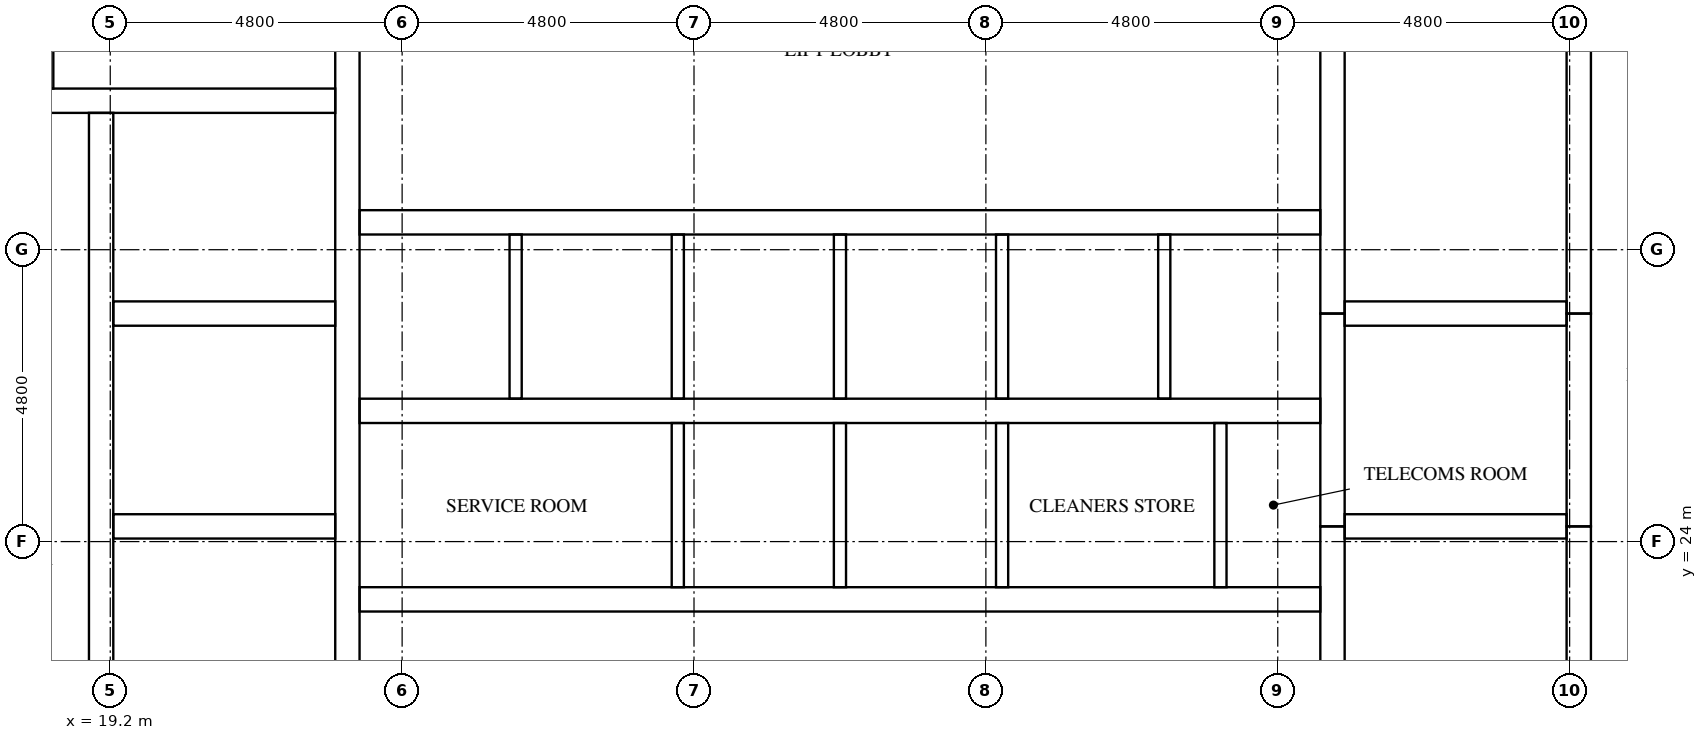
"""IFC4 building model, lengths in metres.
Left out: names, types, materials, properties, quantities, classifications, styles, units other than length and angle.
Written with IfcOpenShell. Run it as: python <this file> out.ifc"""

import sys

from ifc_helpers import new_model, si_unit, direction, frame, frame_2d, origin, place, context, subcontext, project, spatial, rectangle, extrude, element, fill, save


model = new_model("IFC4")
c1 = context("Model", 3, precision=1e-05, world=origin(), true_north=direction((0.0, 1.0)))
c2 = subcontext(c1, "Body", "Model", "MODEL_VIEW")
j1 = project(units=[si_unit("LENGTHUNIT", "METRE"), si_unit("PLANEANGLEUNIT", "RADIAN")], contexts=[c1])
p1 = place(None, origin())
s1 = spatial("IfcSite", under=j1, at=p1, CompositionType="ELEMENT")
p2 = place(p1, origin())
s2 = spatial("IfcBuilding", under=s1, at=p2, CompositionType="ELEMENT")
p3 = place(p2, frame((0.0, 0.0, 282.6)))
s3 = spatial("IfcBuildingStorey", under=s2, at=p3, CompositionType="ELEMENT", Elevation=282.6)
p4 = place(p3, frame((19.05, 15.5, 0.0), z_axis=(0.0, 0.0, 1.0), x_axis=(0.0, 1.0, 0.0)))
e1 = element("IfcWall", 1, at=p4, inside=s3, PredefinedType="SHEAR", context=c2, shape_type="SweptSolid", body=[
    extrude(rectangle(XDim=15.55, YDim=0.4, at=frame_2d((7.775, 0.0))), origin(), (0.0, 0.0, 1.0), 3.2),
])
p5 = place(p4, frame((9.95, 0.0, 0.0)))
e2 = element("IfcOpeningElement", 2, at=p5, cuts=e1, PredefinedType="OPENING", context=c2, shape_type="SweptSolid", body=[
    extrude(rectangle(XDim=1.1, YDim=2.1, at=frame_2d((0.55, 1.05))), frame((0.0, 0.21, 0.0), z_axis=(0.0, -1.0, 0.0), x_axis=(1.0, 0.0, 0.0)), (0.0, 0.0, 1.0), 0.42),
])
p6 = place(p4, frame((13.45, 0.0, 0.0)))
e3 = element("IfcOpeningElement", 3, at=p6, cuts=e1, PredefinedType="OPENING", context=c2, shape_type="SweptSolid", body=[
    extrude(rectangle(XDim=1.1, YDim=2.1, at=frame_2d((0.55, 1.05))), frame((0.0, 0.21, 0.0), z_axis=(0.0, -1.0, 0.0), x_axis=(1.0, 0.0, 0.0)), (0.0, 0.0, 1.0), 0.42),
])
p7 = place(p4, frame((0.7, 0.0, 0.0)))
e4 = element("IfcOpeningElement", 4, at=p7, cuts=e1, PredefinedType="OPENING", context=c2, shape_type="SweptSolid", body=[
    extrude(rectangle(XDim=1.2, YDim=2.1, at=frame_2d((0.6, 1.05))), frame((0.0, 0.21, 0.0), z_axis=(0.0, -1.0, 0.0), x_axis=(1.0, 0.0, 0.0)), (0.0, 0.0, 1.0), 0.42),
])
p8 = place(p3, frame((23.1, 15.5, 0.0), z_axis=(0.0, 0.0, 1.0), x_axis=(0.0, 1.0, 0.0)))
e5 = element("IfcWall", 5, at=p8, inside=s3, PredefinedType="SHEAR", context=c2, shape_type="SweptSolid", body=[
    extrude(rectangle(XDim=21.8, YDim=0.4, at=frame_2d((10.9, 0.0))), origin(), (0.0, 0.0, 1.0), 3.2),
])
p9 = place(p3, frame((39.3, 15.5, 0.0), z_axis=(0.0, 0.0, 1.0), x_axis=(0.0, 1.0, 0.0)))
e6 = element("IfcWall", 6, at=p9, inside=s3, PredefinedType="SHEAR", context=c2, shape_type="SweptSolid", body=[
    extrude(rectangle(XDim=8.75, YDim=0.4, at=frame_2d((4.375, 0.0))), origin(), (0.0, 0.0, 1.0), 3.2),
])
p10 = place(p3, frame((39.3, 24.25, 0.0), z_axis=(0.0, 0.0, 1.0), x_axis=(0.0, 1.0, 0.0)))
e7 = element("IfcWall", 7, at=p10, inside=s3, PredefinedType="SHEAR", context=c2, shape_type="SweptSolid", body=[
    extrude(rectangle(XDim=3.5, YDim=0.4, at=frame_2d((1.75, 0.0))), origin(), (0.0, 0.0, 1.0), 3.2),
])
p11 = place(p3, frame((39.3, 27.75, 0.0), z_axis=(0.0, 0.0, 1.0), x_axis=(0.0, 1.0, 0.0)))
e8 = element("IfcWall", 8, at=p11, inside=s3, PredefinedType="SHEAR", context=c2, shape_type="SweptSolid", body=[
    extrude(rectangle(XDim=9.55, YDim=0.4, at=frame_2d((4.775, 0.0))), origin(), (0.0, 0.0, 1.0), 3.2),
])
p12 = place(p3, frame((43.35, 15.5, 0.0), z_axis=(0.0, 0.0, 1.0), x_axis=(0.0, 1.0, 0.0)))
e9 = element("IfcWall", 9, at=p12, inside=s3, PredefinedType="SHEAR", context=c2, shape_type="SweptSolid", body=[
    extrude(rectangle(XDim=8.75, YDim=0.4, at=frame_2d((4.375, 0.0))), origin(), (0.0, 0.0, 1.0), 3.2),
])
p13 = place(p12, frame((0.7, 0.0, 0.0)))
e10 = element("IfcOpeningElement", 10, at=p13, cuts=e9, PredefinedType="OPENING", context=c2, shape_type="SweptSolid", body=[
    extrude(rectangle(XDim=1.2, YDim=2.1, at=frame_2d((0.6, 1.05))), frame((0.0, 0.21, 0.0), z_axis=(0.0, -1.0, 0.0), x_axis=(1.0, 0.0, 0.0)), (0.0, 0.0, 1.0), 0.42),
])
p14 = place(p3, frame((43.35, 24.25, 0.0), z_axis=(0.0, 0.0, 1.0), x_axis=(0.0, 1.0, 0.0)))
e11 = element("IfcWall", 11, at=p14, inside=s3, PredefinedType="SHEAR", context=c2, shape_type="SweptSolid", body=[
    extrude(rectangle(XDim=3.5, YDim=0.4, at=frame_2d((1.75, 0.0))), origin(), (0.0, 0.0, 1.0), 3.2),
])
p15 = place(p14, frame((1.2, 0.0, 0.0)))
e12 = element("IfcOpeningElement", 12, at=p15, cuts=e11, PredefinedType="OPENING", context=c2, shape_type="SweptSolid", body=[
    extrude(rectangle(XDim=1.1, YDim=2.1, at=frame_2d((0.55, 1.05))), frame((0.0, 0.21, 0.0), z_axis=(0.0, -1.0, 0.0), x_axis=(1.0, 0.0, 0.0)), (0.0, 0.0, 1.0), 0.42),
])
p16 = place(p3, frame((43.35, 27.75, 0.0), z_axis=(0.0, 0.0, 1.0), x_axis=(0.0, 1.0, 0.0)))
e13 = element("IfcWall", 13, at=p16, inside=s3, PredefinedType="SHEAR", context=c2, shape_type="SweptSolid", body=[
    extrude(rectangle(XDim=9.55, YDim=0.4, at=frame_2d((4.775, 0.0))), origin(), (0.0, 0.0, 1.0), 3.2),
])
p17 = place(p16, frame((7.65, 0.0, 0.0)))
e14 = element("IfcOpeningElement", 14, at=p17, cuts=e13, PredefinedType="OPENING", context=c2, shape_type="SweptSolid", body=[
    extrude(rectangle(XDim=1.2, YDim=2.1, at=frame_2d((0.6, 1.05))), frame((0.0, 0.21, 0.0), z_axis=(0.0, -1.0, 0.0), x_axis=(1.0, 0.0, 0.0)), (0.0, 0.0, 1.0), 0.42),
])
for number, where, z_axis, x_axis in (
    (15, (19.25, 24.25, 0.0), (0.0, 0.0, 1.0), (1.0, 0.0, 0.0)),
    (16, (19.25, 27.75, 0.0), (0.0, 0.0, 1.0), (1.0, 0.0, 0.0)),
):
    element("IfcWall", number, at=place(p3, frame(where, z_axis=z_axis, x_axis=x_axis)), inside=s3, PredefinedType="SHEAR", context=c2, shape_type="SweptSolid", body=[
        extrude(rectangle(XDim=3.65, YDim=0.4, at=frame_2d((1.825, 0.0))), origin(), (0.0, 0.0, 1.0), 3.2),
    ])
p18 = place(p3, frame((15.5, 31.25, 0.0), z_axis=(0.0, 0.0, 1.0), x_axis=(1.0, 0.0, 0.0)))
e17 = element("IfcWall", 17, at=p18, inside=s3, PredefinedType="SHEAR", context=c2, shape_type="SweptSolid", body=[
    extrude(rectangle(XDim=7.4, YDim=0.4, at=frame_2d((3.7, 0.0))), origin(), (0.0, 0.0, 1.0), 3.2),
])
for number, where, z_axis, x_axis in (
    (18, (39.5, 24.25, 0.0), (0.0, 0.0, 1.0), (1.0, 0.0, 0.0)),
    (19, (39.5, 27.75, 0.0), (0.0, 0.0, 1.0), (1.0, 0.0, 0.0)),
):
    element("IfcWall", number, at=place(p3, frame(where, z_axis=z_axis, x_axis=x_axis)), inside=s3, PredefinedType="SHEAR", context=c2, shape_type="SweptSolid", body=[
        extrude(rectangle(XDim=3.65, YDim=0.4, at=frame_2d((1.825, 0.0))), origin(), (0.0, 0.0, 1.0), 3.2),
    ])
p19 = place(p3, frame((23.3, 23.05, 0.0), z_axis=(0.0, 0.0, 1.0), x_axis=(1.0, 0.0, 0.0)))
e20 = element("IfcWall", 20, at=p19, inside=s3, PredefinedType="SHEAR", context=c2, shape_type="SweptSolid", body=[
    extrude(rectangle(XDim=15.8, YDim=0.4, at=frame_2d((7.9, 0.0))), origin(), (0.0, 0.0, 1.0), 3.2),
])
p20 = place(p19, frame((2.067, 0.0, 0.0)))
e21 = element("IfcOpeningElement", 21, at=p20, cuts=e20, PredefinedType="OPENING", context=c2, shape_type="SweptSolid", body=[
    extrude(rectangle(XDim=1.0, YDim=2.1, at=frame_2d((0.5, 1.05))), frame((0.0, 0.21, 0.0), z_axis=(0.0, -1.0, 0.0), x_axis=(1.0, 0.0, 0.0)), (0.0, 0.0, 1.0), 0.42),
])
p21 = place(p19, frame((11.862, 0.0, 0.0)))
e22 = element("IfcOpeningElement", 22, at=p21, cuts=e20, PredefinedType="OPENING", context=c2, shape_type="SweptSolid", body=[
    extrude(rectangle(XDim=1.0, YDim=2.1, at=frame_2d((0.5, 1.05))), frame((0.0, 0.21, 0.0), z_axis=(0.0, -1.0, 0.0), x_axis=(1.0, 0.0, 0.0)), (0.0, 0.0, 1.0), 0.42),
])
p22 = place(p19, frame((14.529, 0.0, 0.0)))
e23 = element("IfcOpeningElement", 23, at=p22, cuts=e20, PredefinedType="OPENING", context=c2, shape_type="SweptSolid", body=[
    extrude(rectangle(XDim=1.0, YDim=2.1, at=frame_2d((0.5, 1.05))), frame((0.0, 0.21, 0.0), z_axis=(0.0, -1.0, 0.0), x_axis=(1.0, 0.0, 0.0)), (0.0, 0.0, 1.0), 0.42),
])
p23 = place(p3, frame((23.3, 26.15, 0.0), z_axis=(0.0, 0.0, 1.0), x_axis=(1.0, 0.0, 0.0)))
e24 = element("IfcWall", 24, at=p23, inside=s3, PredefinedType="SHEAR", context=c2, shape_type="SweptSolid", body=[
    extrude(rectangle(XDim=15.8, YDim=0.4, at=frame_2d((7.9, 0.0))), origin(), (0.0, 0.0, 1.0), 3.2),
])
p24 = place(p3, frame((23.3, 29.25, 0.0), z_axis=(0.0, 0.0, 1.0), x_axis=(1.0, 0.0, 0.0)))
e25 = element("IfcWall", 25, at=p24, inside=s3, PredefinedType="SHEAR", context=c2, shape_type="SweptSolid", body=[
    extrude(rectangle(XDim=15.8, YDim=0.4, at=frame_2d((7.9, 0.0))), origin(), (0.0, 0.0, 1.0), 3.2),
])
p25 = place(p24, frame((0.683, 0.0, 0.0)))
e26 = element("IfcOpeningElement", 26, at=p25, cuts=e25, PredefinedType="OPENING", context=c2, shape_type="SweptSolid", body=[
    extrude(rectangle(XDim=1.1, YDim=2.1, at=frame_2d((0.55, 1.05))), frame((0.0, 0.21, 0.0), z_axis=(0.0, -1.0, 0.0), x_axis=(1.0, 0.0, 0.0)), (0.0, 0.0, 1.0), 0.42),
])
p26 = place(p24, frame((3.35, 0.0, 0.0)))
e27 = element("IfcOpeningElement", 27, at=p26, cuts=e25, PredefinedType="OPENING", context=c2, shape_type="SweptSolid", body=[
    extrude(rectangle(XDim=1.1, YDim=2.1, at=frame_2d((0.55, 1.05))), frame((0.0, 0.21, 0.0), z_axis=(0.0, -1.0, 0.0), x_axis=(1.0, 0.0, 0.0)), (0.0, 0.0, 1.0), 0.42),
])
p27 = place(p24, frame((6.017, 0.0, 0.0)))
e28 = element("IfcOpeningElement", 28, at=p27, cuts=e25, PredefinedType="OPENING", context=c2, shape_type="SweptSolid", body=[
    extrude(rectangle(XDim=1.1, YDim=2.1, at=frame_2d((0.55, 1.05))), frame((0.0, 0.21, 0.0), z_axis=(0.0, -1.0, 0.0), x_axis=(1.0, 0.0, 0.0)), (0.0, 0.0, 1.0), 0.42),
])
p28 = place(p24, frame((8.683, 0.0, 0.0)))
e29 = element("IfcOpeningElement", 29, at=p28, cuts=e25, PredefinedType="OPENING", context=c2, shape_type="SweptSolid", body=[
    extrude(rectangle(XDim=1.1, YDim=2.1, at=frame_2d((0.55, 1.05))), frame((0.0, 0.21, 0.0), z_axis=(0.0, -1.0, 0.0), x_axis=(1.0, 0.0, 0.0)), (0.0, 0.0, 1.0), 0.42),
])
p29 = place(p24, frame((11.35, 0.0, 0.0)))
e30 = element("IfcOpeningElement", 30, at=p29, cuts=e25, PredefinedType="OPENING", context=c2, shape_type="SweptSolid", body=[
    extrude(rectangle(XDim=1.1, YDim=2.1, at=frame_2d((0.55, 1.05))), frame((0.0, 0.21, 0.0), z_axis=(0.0, -1.0, 0.0), x_axis=(1.0, 0.0, 0.0)), (0.0, 0.0, 1.0), 0.42),
])
p30 = place(p24, frame((14.017, 0.0, 0.0)))
e31 = element("IfcOpeningElement", 31, at=p30, cuts=e25, PredefinedType="OPENING", context=c2, shape_type="SweptSolid", body=[
    extrude(rectangle(XDim=1.1, YDim=2.1, at=frame_2d((0.55, 1.05))), frame((0.0, 0.21, 0.0), z_axis=(0.0, -1.0, 0.0), x_axis=(1.0, 0.0, 0.0)), (0.0, 0.0, 1.0), 0.42),
])
for number, where, z_axis, x_axis in (
    (32, (25.867, 26.35, 0.0), (0.0, 0.0, 1.0), (0.0, 1.0, 0.0)),
    (33, (28.533, 23.25, 0.0), (0.0, 0.0, 1.0), (0.0, 1.0, 0.0)),
    (34, (28.533, 26.35, 0.0), (0.0, 0.0, 1.0), (0.0, 1.0, 0.0)),
    (35, (31.2, 23.25, 0.0), (0.0, 0.0, 1.0), (0.0, 1.0, 0.0)),
    (36, (31.2, 26.35, 0.0), (0.0, 0.0, 1.0), (0.0, 1.0, 0.0)),
    (37, (33.867, 23.25, 0.0), (0.0, 0.0, 1.0), (0.0, 1.0, 0.0)),
    (38, (33.867, 26.35, 0.0), (0.0, 0.0, 1.0), (0.0, 1.0, 0.0)),
    (39, (36.533, 26.35, 0.0), (0.0, 0.0, 1.0), (0.0, 1.0, 0.0)),
):
    element("IfcWall", number, at=place(p3, frame(where, z_axis=z_axis, x_axis=x_axis)), inside=s3, PredefinedType="SOLIDWALL", context=c2, shape_type="SweptSolid", body=[
        extrude(rectangle(XDim=2.7, YDim=0.2, at=frame_2d((1.35, 0.0))), origin(), (0.0, 0.0, 1.0), 3.2),
    ])
p31 = place(p3, frame((18.164, 31.45, 0.0), z_axis=(0.0, 0.0, 1.0), x_axis=(0.0, 1.0, 0.0)))
e40 = element("IfcWall", 40, at=p31, inside=s3, PredefinedType="PARTITIONING", context=c2, shape_type="SweptSolid", body=[
    extrude(rectangle(XDim=5.85, YDim=0.2, at=frame_2d((2.925, 0.0))), origin(), (0.0, 0.0, 1.0), 3.2),
])
p32 = place(p3, frame((37.457, 23.25, 0.0), z_axis=(0.0, 0.0, 1.0), x_axis=(0.0, 1.0, 0.0)))
e41 = element("IfcWall", 41, at=p32, inside=s3, PredefinedType="PARTITIONING", context=c2, shape_type="SweptSolid", body=[
    extrude(rectangle(XDim=2.7, YDim=0.2, at=frame_2d((1.35, 0.0))), origin(), (0.0, 0.0, 1.0), 3.2),
])
p33 = place(p25, origin())
e42 = element("IfcDoor", 42, at=p33, inside=s3, OperationType="DOUBLE_DOOR_SLIDING", PredefinedType="DOOR", context=c2, shape_type="SweptSolid", body=[
    extrude(rectangle(XDim=1.1, YDim=2.1, at=frame_2d((0.55, 1.05))), frame((0.0, 0.025, 0.0), z_axis=(0.0, -1.0, 0.0), x_axis=(1.0, 0.0, 0.0)), (0.0, 0.0, 1.0), 0.05),
])
fill(e26, e42)
p34 = place(p26, origin())
e43 = element("IfcDoor", 43, at=p34, inside=s3, OperationType="DOUBLE_DOOR_SLIDING", PredefinedType="DOOR", context=c2, shape_type="SweptSolid", body=[
    extrude(rectangle(XDim=1.1, YDim=2.1, at=frame_2d((0.55, 1.05))), frame((0.0, 0.025, 0.0), z_axis=(0.0, -1.0, 0.0), x_axis=(1.0, 0.0, 0.0)), (0.0, 0.0, 1.0), 0.05),
])
fill(e27, e43)
p35 = place(p27, origin())
e44 = element("IfcDoor", 44, at=p35, inside=s3, OperationType="DOUBLE_DOOR_SLIDING", PredefinedType="DOOR", context=c2, shape_type="SweptSolid", body=[
    extrude(rectangle(XDim=1.1, YDim=2.1, at=frame_2d((0.55, 1.05))), frame((0.0, 0.025, 0.0), z_axis=(0.0, -1.0, 0.0), x_axis=(1.0, 0.0, 0.0)), (0.0, 0.0, 1.0), 0.05),
])
fill(e28, e44)
p36 = place(p28, origin())
e45 = element("IfcDoor", 45, at=p36, inside=s3, OperationType="DOUBLE_DOOR_SLIDING", PredefinedType="DOOR", context=c2, shape_type="SweptSolid", body=[
    extrude(rectangle(XDim=1.1, YDim=2.1, at=frame_2d((0.55, 1.05))), frame((0.0, 0.025, 0.0), z_axis=(0.0, -1.0, 0.0), x_axis=(1.0, 0.0, 0.0)), (0.0, 0.0, 1.0), 0.05),
])
fill(e29, e45)
p37 = place(p29, origin())
e46 = element("IfcDoor", 46, at=p37, inside=s3, OperationType="DOUBLE_DOOR_SLIDING", PredefinedType="DOOR", context=c2, shape_type="SweptSolid", body=[
    extrude(rectangle(XDim=1.1, YDim=2.1, at=frame_2d((0.55, 1.05))), frame((0.0, 0.025, 0.0), z_axis=(0.0, -1.0, 0.0), x_axis=(1.0, 0.0, 0.0)), (0.0, 0.0, 1.0), 0.05),
])
fill(e30, e46)
p38 = place(p30, origin())
e47 = element("IfcDoor", 47, at=p38, inside=s3, OperationType="DOUBLE_DOOR_SLIDING", PredefinedType="DOOR", context=c2, shape_type="SweptSolid", body=[
    extrude(rectangle(XDim=1.1, YDim=2.1, at=frame_2d((0.55, 1.05))), frame((0.0, 0.025, 0.0), z_axis=(0.0, -1.0, 0.0), x_axis=(1.0, 0.0, 0.0)), (0.0, 0.0, 1.0), 0.05),
])
fill(e31, e47)
p39 = place(p5, origin())
e48 = element("IfcDoor", 48, at=p39, inside=s3, OperationType="DOUBLE_DOOR_SLIDING", PredefinedType="DOOR", context=c2, shape_type="SweptSolid", body=[
    extrude(rectangle(XDim=1.1, YDim=2.1, at=frame_2d((0.55, 1.05))), frame((0.0, 0.025, 0.0), z_axis=(0.0, -1.0, 0.0), x_axis=(1.0, 0.0, 0.0)), (0.0, 0.0, 1.0), 0.05),
])
fill(e2, e48)
p40 = place(p6, origin())
e49 = element("IfcDoor", 49, at=p40, inside=s3, OperationType="DOUBLE_DOOR_SLIDING", PredefinedType="DOOR", context=c2, shape_type="SweptSolid", body=[
    extrude(rectangle(XDim=1.1, YDim=2.1, at=frame_2d((0.55, 1.05))), frame((0.0, 0.025, 0.0), z_axis=(0.0, -1.0, 0.0), x_axis=(1.0, 0.0, 0.0)), (0.0, 0.0, 1.0), 0.05),
])
fill(e3, e49)
p41 = place(p15, origin())
e50 = element("IfcDoor", 50, at=p41, inside=s3, OperationType="DOUBLE_DOOR_SLIDING", PredefinedType="DOOR", context=c2, shape_type="SweptSolid", body=[
    extrude(rectangle(XDim=1.1, YDim=2.1, at=frame_2d((0.55, 1.05))), frame((0.0, 0.025, 0.0), z_axis=(0.0, -1.0, 0.0), x_axis=(1.0, 0.0, 0.0)), (0.0, 0.0, 1.0), 0.05),
])
fill(e12, e50)
p42 = place(p20, frame((1.0, 0.0, 0.0), z_axis=(0.0, 0.0, 1.0), x_axis=(-1.0, 0.0, 0.0)))
e51 = element("IfcDoor", 51, at=p42, inside=s3, OperationType="SINGLE_SWING_LEFT", PredefinedType="DOOR", context=c2, shape_type="SweptSolid", body=[
    extrude(rectangle(XDim=1.0, YDim=2.1, at=frame_2d((0.5, 1.05))), frame((0.0, 0.025, 0.0), z_axis=(0.0, -1.0, 0.0), x_axis=(1.0, 0.0, 0.0)), (0.0, 0.0, 1.0), 0.05),
])
fill(e21, e51)
p43 = place(p21, frame((1.0, 0.0, 0.0), z_axis=(0.0, 0.0, 1.0), x_axis=(-1.0, 0.0, 0.0)))
e52 = element("IfcDoor", 52, at=p43, inside=s3, OperationType="SINGLE_SWING_RIGHT", PredefinedType="DOOR", context=c2, shape_type="SweptSolid", body=[
    extrude(rectangle(XDim=1.0, YDim=2.1, at=frame_2d((0.5, 1.05))), frame((0.0, 0.025, 0.0), z_axis=(0.0, -1.0, 0.0), x_axis=(1.0, 0.0, 0.0)), (0.0, 0.0, 1.0), 0.05),
])
fill(e22, e52)
p44 = place(p22, frame((1.0, 0.0, 0.0), z_axis=(0.0, 0.0, 1.0), x_axis=(-1.0, 0.0, 0.0)))
e53 = element("IfcDoor", 53, at=p44, inside=s3, OperationType="SINGLE_SWING_LEFT", PredefinedType="DOOR", context=c2, shape_type="SweptSolid", body=[
    extrude(rectangle(XDim=1.0, YDim=2.1, at=frame_2d((0.5, 1.05))), frame((0.0, 0.025, 0.0), z_axis=(0.0, -1.0, 0.0), x_axis=(1.0, 0.0, 0.0)), (0.0, 0.0, 1.0), 0.05),
])
fill(e23, e53)
save(model, sys.argv[1])
